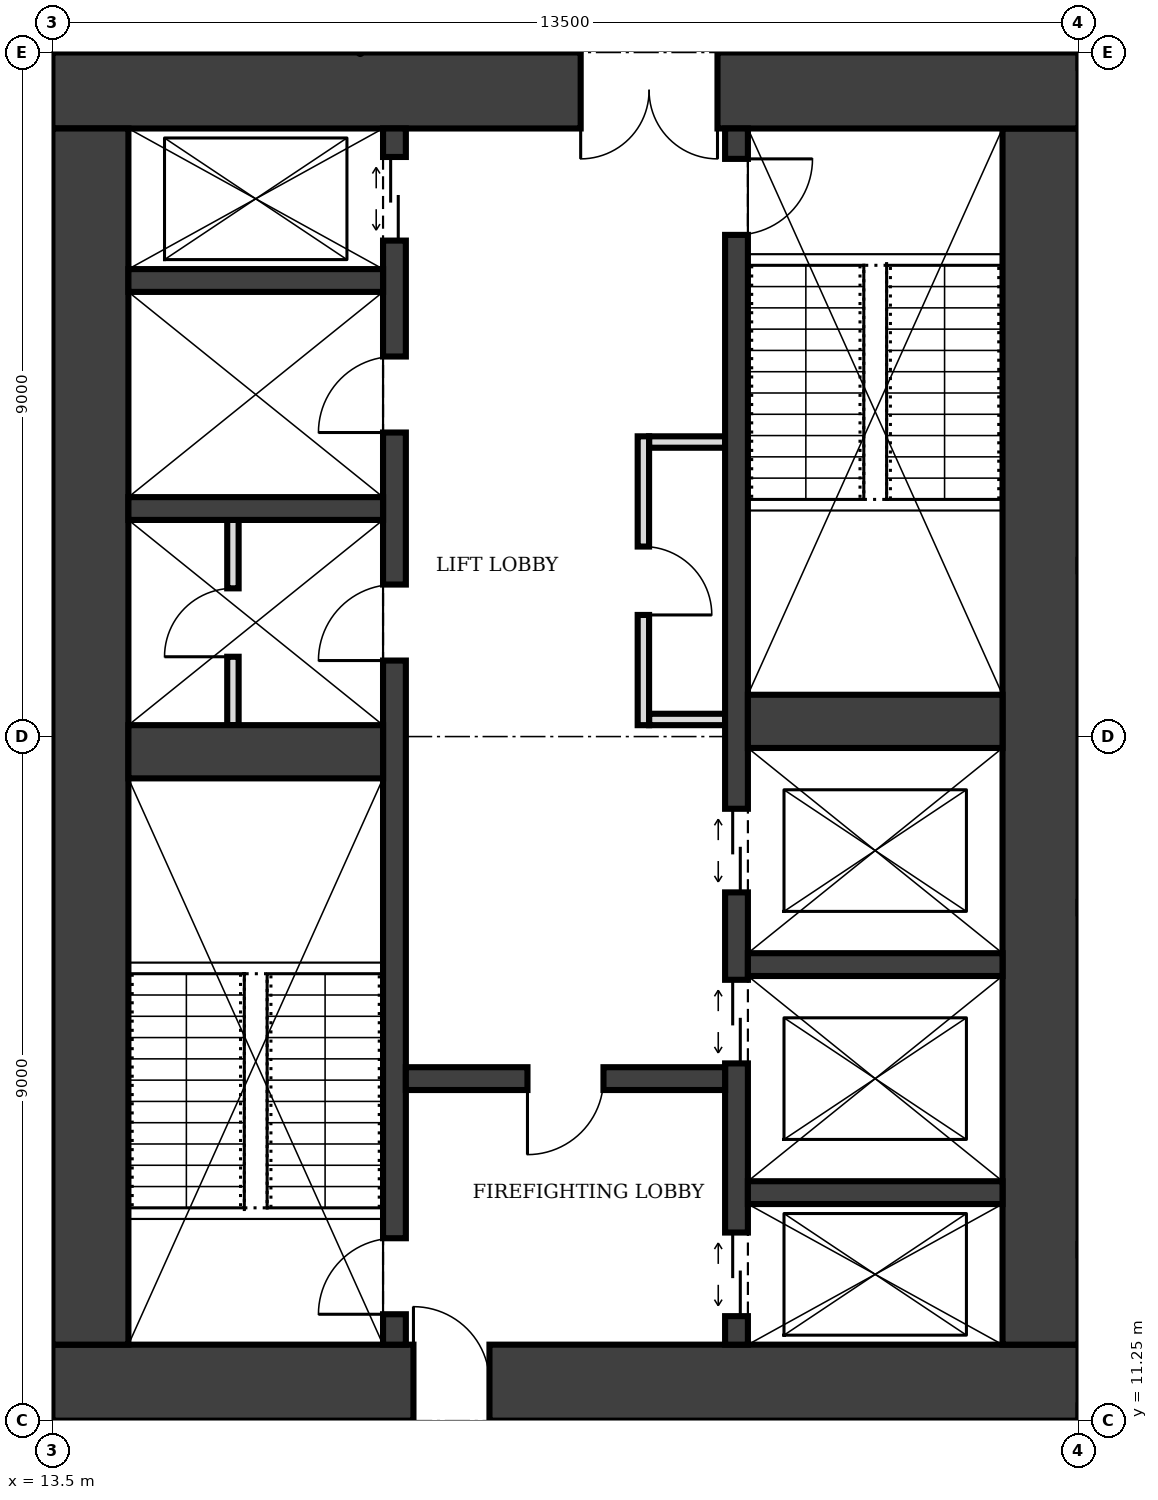
"""IFC4 building model, lengths in metres.
Left out: names, types, materials, properties, quantities, classifications, styles, units other than length and angle.
Written with IfcOpenShell. Run it as: python <this file> out.ifc"""

import sys

from ifc_helpers import new_model, si_unit, direction, frame, frame_2d, origin, place, context, subcontext, project, spatial, rectangle, extrude, element, fill, save


model = new_model("IFC4")
c1 = context("Model", 3, precision=1e-05, world=origin(), true_north=direction((0.0, 1.0)))
c2 = subcontext(c1, "Body", "Model", "MODEL_VIEW")
j1 = project(units=[si_unit("LENGTHUNIT", "METRE"), si_unit("PLANEANGLEUNIT", "RADIAN")], contexts=[c1])
p1 = place(None, origin())
s1 = spatial("IfcSite", under=j1, at=p1, CompositionType="ELEMENT")
p2 = place(p1, origin())
s2 = spatial("IfcBuilding", under=s1, at=p2, CompositionType="ELEMENT")
p3 = place(p2, frame((0.0, 0.0, 149.0)))
s3 = spatial("IfcBuildingStorey", under=s2, at=p3, CompositionType="ELEMENT", Elevation=149.0)
p4 = place(p3, frame((13.5, 11.75, 0.0), z_axis=(0.0, 0.0, 1.0), x_axis=(1.0, 0.0, 0.0)))
e1 = element("IfcWall", 1, at=p4, inside=s3, PredefinedType="SHEAR", context=c2, shape_type="SweptSolid", body=[
    extrude(rectangle(XDim=13.5, YDim=1.0, at=frame_2d((6.75, 0.0))), origin(), (0.0, 0.0, 1.0), 4.0),
])
p5 = place(p4, frame((4.75, 0.0, 0.0)))
e2 = element("IfcOpeningElement", 2, at=p5, cuts=e1, PredefinedType="OPENING", context=c2, shape_type="SweptSolid", body=[
    extrude(rectangle(XDim=1.0, YDim=2.1, at=frame_2d((0.5, 1.05))), frame((0.0, 0.51, 0.0), z_axis=(0.0, -1.0, 0.0), x_axis=(1.0, 0.0, 0.0)), (0.0, 0.0, 1.0), 1.02),
])
p6 = place(p3, frame((26.5, 12.25, 0.0), z_axis=(0.0, 0.0, 1.0), x_axis=(0.0, 1.0, 0.0)))
e3 = element("IfcWall", 3, at=p6, inside=s3, PredefinedType="SHEAR", context=c2, shape_type="SweptSolid", body=[
    extrude(rectangle(XDim=16.0, YDim=1.0, at=frame_2d((8.0, 0.0))), origin(), (0.0, 0.0, 1.0), 4.0),
])
p7 = place(p3, frame((27.0, 28.75, 0.0), z_axis=(0.0, 0.0, 1.0), x_axis=(-1.0, 0.0, 0.0)))
e4 = element("IfcWall", 4, at=p7, inside=s3, PredefinedType="SHEAR", context=c2, shape_type="SweptSolid", body=[
    extrude(rectangle(XDim=13.5, YDim=1.0, at=frame_2d((6.75, 0.0))), origin(), (0.0, 0.0, 1.0), 4.0),
])
p8 = place(p7, frame((4.75, 0.0, 0.0)))
e5 = element("IfcOpeningElement", 5, at=p8, cuts=e4, PredefinedType="OPENING", context=c2, shape_type="SweptSolid", body=[
    extrude(rectangle(XDim=1.8, YDim=2.1, at=frame_2d((0.9, 1.05))), frame((0.0, 0.51, 0.0), z_axis=(0.0, -1.0, 0.0), x_axis=(1.0, 0.0, 0.0)), (0.0, 0.0, 1.0), 1.02),
])
p9 = place(p3, frame((14.0, 28.25, 0.0), z_axis=(0.0, 0.0, 1.0), x_axis=(0.0, -1.0, 0.0)))
e6 = element("IfcWall", 6, at=p9, inside=s3, PredefinedType="SHEAR", context=c2, shape_type="SweptSolid", body=[
    extrude(rectangle(XDim=16.0, YDim=1.0, at=frame_2d((8.0, 0.0))), origin(), (0.0, 0.0, 1.0), 4.0),
])
p10 = place(p3, frame((18.0, 12.25, 0.0), z_axis=(0.0, 0.0, 1.0), x_axis=(0.0, 1.0, 0.0)))
e7 = element("IfcWall", 7, at=p10, inside=s3, PredefinedType="SHEAR", context=c2, shape_type="SweptSolid", body=[
    extrude(rectangle(XDim=16.0, YDim=0.3, at=frame_2d((8.0, 0.0))), origin(), (0.0, 0.0, 1.0), 4.0),
])
p11 = place(p10, frame((0.4, 0.0, 0.0)))
e8 = element("IfcOpeningElement", 8, at=p11, cuts=e7, PredefinedType="OPENING", context=c2, shape_type="SweptSolid", body=[
    extrude(rectangle(XDim=1.0, YDim=2.1, at=frame_2d((0.5, 1.05))), frame((0.0, 0.16, 0.0), z_axis=(0.0, -1.0, 0.0), x_axis=(1.0, 0.0, 0.0)), (0.0, 0.0, 1.0), 0.32),
])
p12 = place(p10, frame((14.525, 0.0, 0.0)))
e9 = element("IfcOpeningElement", 9, at=p12, cuts=e7, PredefinedType="OPENING", context=c2, shape_type="SweptSolid", body=[
    extrude(rectangle(XDim=1.1, YDim=2.1, at=frame_2d((0.55, 1.05))), frame((0.0, 0.16, 0.0), z_axis=(0.0, -1.0, 0.0), x_axis=(1.0, 0.0, 0.0)), (0.0, 0.0, 1.0), 0.32),
])
p13 = place(p10, frame((9.0, 0.0, 0.0)))
e10 = element("IfcOpeningElement", 10, at=p13, cuts=e7, PredefinedType="OPENING", context=c2, shape_type="SweptSolid", body=[
    extrude(rectangle(XDim=1.0, YDim=2.1, at=frame_2d((0.5, 1.05))), frame((0.0, 0.16, 0.0), z_axis=(0.0, -1.0, 0.0), x_axis=(1.0, 0.0, 0.0)), (0.0, 0.0, 1.0), 0.32),
])
p14 = place(p10, frame((12.0, 0.0, 0.0)))
e11 = element("IfcOpeningElement", 11, at=p14, cuts=e7, PredefinedType="OPENING", context=c2, shape_type="SweptSolid", body=[
    extrude(rectangle(XDim=1.0, YDim=2.1, at=frame_2d((0.5, 1.05))), frame((0.0, 0.16, 0.0), z_axis=(0.0, -1.0, 0.0), x_axis=(1.0, 0.0, 0.0)), (0.0, 0.0, 1.0), 0.32),
])
p15 = place(p3, frame((22.5, 12.25, 0.0), z_axis=(0.0, 0.0, 1.0), x_axis=(0.0, 1.0, 0.0)))
e12 = element("IfcWall", 12, at=p15, inside=s3, PredefinedType="SHEAR", context=c2, shape_type="SweptSolid", body=[
    extrude(rectangle(XDim=16.0, YDim=0.3, at=frame_2d((8.0, 0.0))), origin(), (0.0, 0.0, 1.0), 4.0),
])
p16 = place(p15, frame((14.6, 0.0, 0.0)))
e13 = element("IfcOpeningElement", 13, at=p16, cuts=e12, PredefinedType="OPENING", context=c2, shape_type="SweptSolid", body=[
    extrude(rectangle(XDim=1.0, YDim=2.1, at=frame_2d((0.5, 1.05))), frame((0.0, 0.16, 0.0), z_axis=(0.0, -1.0, 0.0), x_axis=(1.0, 0.0, 0.0)), (0.0, 0.0, 1.0), 0.32),
])
p17 = place(p15, frame((0.375, 0.0, 0.0)))
e14 = element("IfcOpeningElement", 14, at=p17, cuts=e12, PredefinedType="OPENING", context=c2, shape_type="SweptSolid", body=[
    extrude(rectangle(XDim=1.1, YDim=2.1, at=frame_2d((0.55, 1.05))), frame((0.0, 0.16, 0.0), z_axis=(0.0, -1.0, 0.0), x_axis=(1.0, 0.0, 0.0)), (0.0, 0.0, 1.0), 0.32),
])
p18 = place(p15, frame((3.7, 0.0, 0.0)))
e15 = element("IfcOpeningElement", 15, at=p18, cuts=e12, PredefinedType="OPENING", context=c2, shape_type="SweptSolid", body=[
    extrude(rectangle(XDim=1.1, YDim=2.1, at=frame_2d((0.55, 1.05))), frame((0.0, 0.16, 0.0), z_axis=(0.0, -1.0, 0.0), x_axis=(1.0, 0.0, 0.0)), (0.0, 0.0, 1.0), 0.32),
])
p19 = place(p15, frame((5.95, 0.0, 0.0)))
e16 = element("IfcOpeningElement", 16, at=p19, cuts=e12, PredefinedType="OPENING", context=c2, shape_type="SweptSolid", body=[
    extrude(rectangle(XDim=1.1, YDim=2.1, at=frame_2d((0.55, 1.05))), frame((0.0, 0.16, 0.0), z_axis=(0.0, -1.0, 0.0), x_axis=(1.0, 0.0, 0.0)), (0.0, 0.0, 1.0), 0.32),
])
p20 = place(p3, frame((14.5, 20.05, 0.0), z_axis=(0.0, 0.0, 1.0), x_axis=(1.0, 0.0, 0.0)))
e17 = element("IfcWall", 17, at=p20, inside=s3, PredefinedType="SHEAR", context=c2, shape_type="SweptSolid", body=[
    extrude(rectangle(XDim=3.35, YDim=0.7, at=frame_2d((1.675, 0.0))), origin(), (0.0, 0.0, 1.0), 4.0),
])
p21 = place(p3, frame((18.15, 15.75, 0.0), z_axis=(0.0, 0.0, 1.0), x_axis=(1.0, 0.0, 0.0)))
e18 = element("IfcWall", 18, at=p21, inside=s3, PredefinedType="SHEAR", context=c2, shape_type="SweptSolid", body=[
    extrude(rectangle(XDim=4.2, YDim=0.3, at=frame_2d((2.1, 0.0))), origin(), (0.0, 0.0, 1.0), 4.0),
])
p22 = place(p21, frame((1.6, 0.0, 0.0)))
e19 = element("IfcOpeningElement", 19, at=p22, cuts=e18, PredefinedType="OPENING", context=c2, shape_type="SweptSolid", body=[
    extrude(rectangle(XDim=1.0, YDim=2.1, at=frame_2d((0.5, 1.05))), frame((0.0, 0.16, 0.0), z_axis=(0.0, -1.0, 0.0), x_axis=(1.0, 0.0, 0.0)), (0.0, 0.0, 1.0), 0.32),
])
for number, where, z_axis, x_axis in (
    (20, (22.65, 14.25, 0.0), (0.0, 0.0, 1.0), (1.0, 0.0, 0.0)),
    (21, (22.65, 17.25, 0.0), (0.0, 0.0, 1.0), (1.0, 0.0, 0.0)),
):
    element("IfcWall", number, at=place(p3, frame(where, z_axis=z_axis, x_axis=x_axis)), inside=s3, PredefinedType="SHEAR", context=c2, shape_type="SweptSolid", body=[
        extrude(rectangle(XDim=3.35, YDim=0.3, at=frame_2d((1.675, 0.0))), origin(), (0.0, 0.0, 1.0), 4.0),
    ])
p23 = place(p3, frame((22.65, 20.45, 0.0), z_axis=(0.0, 0.0, 1.0), x_axis=(1.0, 0.0, 0.0)))
e22 = element("IfcWall", 22, at=p23, inside=s3, PredefinedType="SHEAR", context=c2, shape_type="SweptSolid", body=[
    extrude(rectangle(XDim=3.35, YDim=0.7, at=frame_2d((1.675, 0.0))), origin(), (0.0, 0.0, 1.0), 4.0),
])
for number, where, z_axis, x_axis in (
    (23, (14.5, 23.25, 0.0), (0.0, 0.0, 1.0), (1.0, 0.0, 0.0)),
    (24, (14.5, 26.25, 0.0), (0.0, 0.0, 1.0), (1.0, 0.0, 0.0)),
):
    element("IfcWall", number, at=place(p3, frame(where, z_axis=z_axis, x_axis=x_axis)), inside=s3, PredefinedType="SHEAR", context=c2, shape_type="SweptSolid", body=[
        extrude(rectangle(XDim=3.35, YDim=0.3, at=frame_2d((1.675, 0.0))), origin(), (0.0, 0.0, 1.0), 4.0),
    ])
p24 = place(p3, frame((21.275, 20.4, 0.0), z_axis=(0.0, 0.0, 1.0), x_axis=(0.0, 1.0, 0.0)))
e25 = element("IfcWall", 25, at=p24, inside=s3, PredefinedType="PARTITIONING", context=c2, shape_type="SweptSolid", body=[
    extrude(rectangle(XDim=3.8, YDim=0.15, at=frame_2d((1.9, 0.0))), origin(), (0.0, 0.0, 1.0), 3.75),
])
p25 = place(p24, frame((1.45, 0.0, 0.0)))
e26 = element("IfcOpeningElement", 26, at=p25, cuts=e25, PredefinedType="OPENING", context=c2, shape_type="SweptSolid", body=[
    extrude(rectangle(XDim=0.9, YDim=2.1, at=frame_2d((0.45, 1.05))), frame((0.0, 0.085, 0.0), z_axis=(0.0, -1.0, 0.0), x_axis=(1.0, 0.0, 0.0)), (0.0, 0.0, 1.0), 0.17),
])
for number, where, z_axis, x_axis in (
    (27, (21.35, 20.475, 0.0), (0.0, 0.0, 1.0), (1.0, 0.0, 0.0)),
    (28, (21.35, 24.125, 0.0), (0.0, 0.0, 1.0), (1.0, 0.0, 0.0)),
):
    element("IfcWall", number, at=place(p3, frame(where, z_axis=z_axis, x_axis=x_axis)), inside=s3, PredefinedType="PARTITIONING", context=c2, shape_type="SweptSolid", body=[
        extrude(rectangle(XDim=1.0, YDim=0.15, at=frame_2d((0.5, 0.0))), origin(), (0.0, 0.0, 1.0), 3.75),
    ])
p26 = place(p3, frame((15.875, 20.4, 0.0), z_axis=(0.0, 0.0, 1.0), x_axis=(0.0, 1.0, 0.0)))
e29 = element("IfcWall", 29, at=p26, inside=s3, PredefinedType="PARTITIONING", context=c2, shape_type="SweptSolid", body=[
    extrude(rectangle(XDim=2.7, YDim=0.15, at=frame_2d((1.35, 0.0))), origin(), (0.0, 0.0, 1.0), 3.75),
])
p27 = place(p26, frame((0.9, 0.0, 0.0)))
e30 = element("IfcOpeningElement", 30, at=p27, cuts=e29, PredefinedType="OPENING", context=c2, shape_type="SweptSolid", body=[
    extrude(rectangle(XDim=0.9, YDim=2.1, at=frame_2d((0.45, 1.05))), frame((0.0, 0.085, 0.0), z_axis=(0.0, -1.0, 0.0), x_axis=(1.0, 0.0, 0.0)), (0.0, 0.0, 1.0), 0.17),
])
for number, where, z_axis, x_axis in (
    (31, (27.0, 11.35, 0.0), (0.0, 0.0, 1.0), (1.0, 0.0, 0.0)),
    (32, (27.0, 29.15, 0.0), (0.0, 0.0, 1.0), (1.0, 0.0, 0.0)),
):
    element("IfcWall", number, at=place(p3, frame(where, z_axis=z_axis, x_axis=x_axis)), inside=s3, PredefinedType="SOLIDWALL", context=c2, shape_type="SweptSolid", body=[
        extrude(rectangle(XDim=7.93, YDim=0.2, at=frame_2d((3.965, 0.0))), origin(), (0.0, 0.0, 1.0), 2.85),
    ])
p28 = place(p5, origin())
e33 = element("IfcDoor", 33, at=p28, inside=s3, OperationType="SINGLE_SWING_LEFT", PredefinedType="DOOR", context=c2, shape_type="SweptSolid", body=[
    extrude(rectangle(XDim=1.0, YDim=2.1, at=frame_2d((0.5, 1.05))), frame((0.0, 0.025, 0.0), z_axis=(0.0, -1.0, 0.0), x_axis=(1.0, 0.0, 0.0)), (0.0, 0.0, 1.0), 0.05),
])
fill(e2, e33)
p29 = place(p8, origin())
e34 = element("IfcDoor", 34, at=p29, inside=s3, OperationType="DOUBLE_DOOR_SINGLE_SWING", PredefinedType="DOOR", context=c2, shape_type="SweptSolid", body=[
    extrude(rectangle(XDim=1.8, YDim=2.1, at=frame_2d((0.9, 1.05))), frame((0.0, 0.025, 0.0), z_axis=(0.0, -1.0, 0.0), x_axis=(1.0, 0.0, 0.0)), (0.0, 0.0, 1.0), 0.05),
])
fill(e5, e34)
p30 = place(p22, frame((1.0, 0.0, 0.0), z_axis=(0.0, 0.0, 1.0), x_axis=(-1.0, 0.0, 0.0)))
e35 = element("IfcDoor", 35, at=p30, inside=s3, OperationType="SINGLE_SWING_RIGHT", PredefinedType="DOOR", context=c2, shape_type="SweptSolid", body=[
    extrude(rectangle(XDim=1.0, YDim=2.1, at=frame_2d((0.5, 1.05))), frame((0.0, 0.025, 0.0), z_axis=(0.0, -1.0, 0.0), x_axis=(1.0, 0.0, 0.0)), (0.0, 0.0, 1.0), 0.05),
])
fill(e19, e35)
p31 = place(p11, origin())
e36 = element("IfcDoor", 36, at=p31, inside=s3, OperationType="SINGLE_SWING_LEFT", PredefinedType="DOOR", context=c2, shape_type="SweptSolid", body=[
    extrude(rectangle(XDim=1.0, YDim=2.1, at=frame_2d((0.5, 1.05))), frame((0.0, 0.025, 0.0), z_axis=(0.0, -1.0, 0.0), x_axis=(1.0, 0.0, 0.0)), (0.0, 0.0, 1.0), 0.05),
])
fill(e8, e36)
p32 = place(p16, frame((1.0, 0.0, 0.0), z_axis=(0.0, 0.0, 1.0), x_axis=(-1.0, 0.0, 0.0)))
e37 = element("IfcDoor", 37, at=p32, inside=s3, OperationType="SINGLE_SWING_LEFT", PredefinedType="DOOR", context=c2, shape_type="SweptSolid", body=[
    extrude(rectangle(XDim=1.0, YDim=2.1, at=frame_2d((0.5, 1.05))), frame((0.0, 0.025, 0.0), z_axis=(0.0, -1.0, 0.0), x_axis=(1.0, 0.0, 0.0)), (0.0, 0.0, 1.0), 0.05),
])
fill(e13, e37)
p33 = place(p17, origin())
e38 = element("IfcDoor", 38, at=p33, inside=s3, OperationType="DOUBLE_DOOR_SLIDING", PredefinedType="DOOR", context=c2, shape_type="SweptSolid", body=[
    extrude(rectangle(XDim=1.1, YDim=2.1, at=frame_2d((0.55, 1.05))), frame((0.0, 0.025, 0.0), z_axis=(0.0, -1.0, 0.0), x_axis=(1.0, 0.0, 0.0)), (0.0, 0.0, 1.0), 0.05),
])
fill(e14, e38)
p34 = place(p12, origin())
e39 = element("IfcDoor", 39, at=p34, inside=s3, OperationType="DOUBLE_DOOR_SLIDING", PredefinedType="DOOR", context=c2, shape_type="SweptSolid", body=[
    extrude(rectangle(XDim=1.1, YDim=2.1, at=frame_2d((0.55, 1.05))), frame((0.0, 0.025, 0.0), z_axis=(0.0, -1.0, 0.0), x_axis=(1.0, 0.0, 0.0)), (0.0, 0.0, 1.0), 0.05),
])
fill(e9, e39)
p35 = place(p18, origin())
e40 = element("IfcDoor", 40, at=p35, inside=s3, OperationType="DOUBLE_DOOR_SLIDING", PredefinedType="DOOR", context=c2, shape_type="SweptSolid", body=[
    extrude(rectangle(XDim=1.1, YDim=2.1, at=frame_2d((0.55, 1.05))), frame((0.0, 0.025, 0.0), z_axis=(0.0, -1.0, 0.0), x_axis=(1.0, 0.0, 0.0)), (0.0, 0.0, 1.0), 0.05),
])
fill(e15, e40)
p36 = place(p19, origin())
e41 = element("IfcDoor", 41, at=p36, inside=s3, OperationType="DOUBLE_DOOR_SLIDING", PredefinedType="DOOR", context=c2, shape_type="SweptSolid", body=[
    extrude(rectangle(XDim=1.1, YDim=2.1, at=frame_2d((0.55, 1.05))), frame((0.0, 0.025, 0.0), z_axis=(0.0, -1.0, 0.0), x_axis=(1.0, 0.0, 0.0)), (0.0, 0.0, 1.0), 0.05),
])
fill(e16, e41)
p37 = place(p25, frame((0.9, 0.0, 0.0), z_axis=(0.0, 0.0, 1.0), x_axis=(-1.0, 0.0, 0.0)))
e42 = element("IfcDoor", 42, at=p37, inside=s3, OperationType="SINGLE_SWING_RIGHT", PredefinedType="DOOR", context=c2, shape_type="SweptSolid", body=[
    extrude(rectangle(XDim=0.9, YDim=2.1, at=frame_2d((0.45, 1.05))), frame((0.0, 0.025, 0.0), z_axis=(0.0, -1.0, 0.0), x_axis=(1.0, 0.0, 0.0)), (0.0, 0.0, 1.0), 0.05),
])
fill(e26, e42)
p38 = place(p13, origin())
e43 = element("IfcDoor", 43, at=p38, inside=s3, OperationType="SINGLE_SWING_LEFT", PredefinedType="DOOR", context=c2, shape_type="SweptSolid", body=[
    extrude(rectangle(XDim=1.0, YDim=2.1, at=frame_2d((0.5, 1.05))), frame((0.0, 0.025, 0.0), z_axis=(0.0, -1.0, 0.0), x_axis=(1.0, 0.0, 0.0)), (0.0, 0.0, 1.0), 0.05),
])
fill(e10, e43)
p39 = place(p27, origin())
e44 = element("IfcDoor", 44, at=p39, inside=s3, OperationType="SINGLE_SWING_LEFT", PredefinedType="DOOR", context=c2, shape_type="SweptSolid", body=[
    extrude(rectangle(XDim=0.9, YDim=2.1, at=frame_2d((0.45, 1.05))), frame((0.0, 0.025, 0.0), z_axis=(0.0, -1.0, 0.0), x_axis=(1.0, 0.0, 0.0)), (0.0, 0.0, 1.0), 0.05),
])
fill(e30, e44)
p40 = place(p14, origin())
e45 = element("IfcDoor", 45, at=p40, inside=s3, OperationType="SINGLE_SWING_LEFT", PredefinedType="DOOR", context=c2, shape_type="SweptSolid", body=[
    extrude(rectangle(XDim=1.0, YDim=2.1, at=frame_2d((0.5, 1.05))), frame((0.0, 0.025, 0.0), z_axis=(0.0, -1.0, 0.0), x_axis=(1.0, 0.0, 0.0)), (0.0, 0.0, 1.0), 0.05),
])
fill(e11, e45)
save(model, sys.argv[1])
